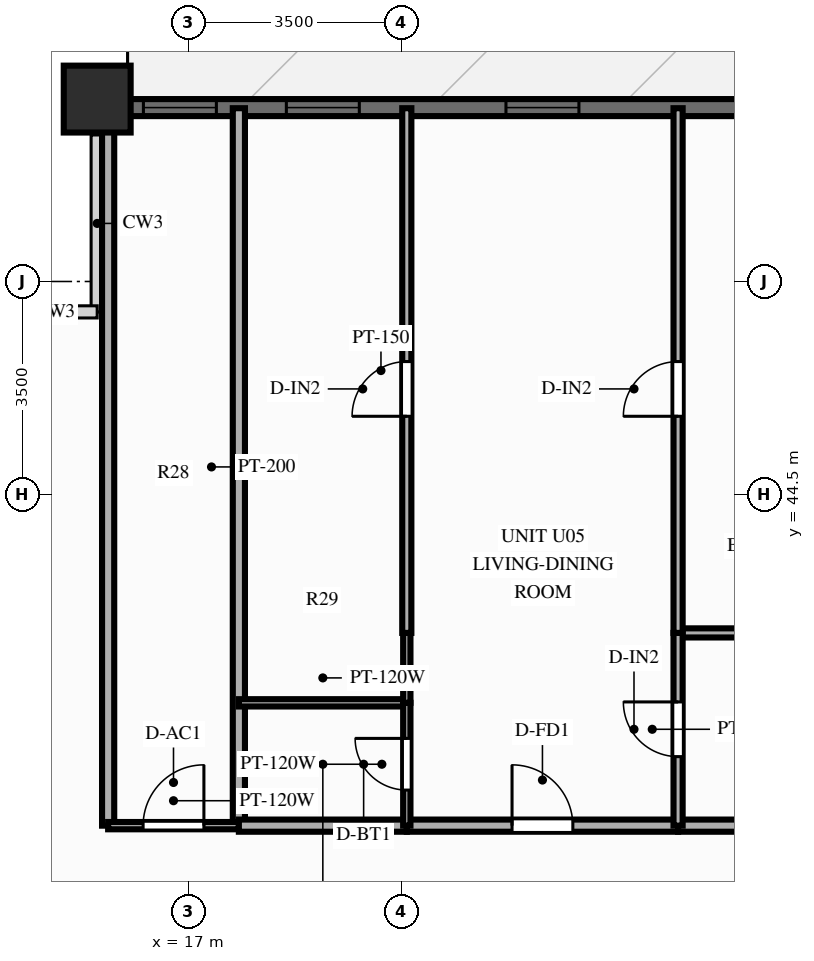
"""IFC4 building model, lengths in metres.
Left out: names, types, materials, properties, quantities, classifications, styles, units other than length and angle.
Written with IfcOpenShell. Run it as: python <this file> out.ifc"""

import sys

from ifc_helpers import new_model, si_unit, direction, frame, frame_2d, origin, origin_2d, place, context, subcontext, project, spatial, rectangle, extrude, source, transform, mapped, element, fill, save


model = new_model("IFC4")
c1 = context("Model", 3, precision=1e-05, world=origin(), true_north=direction((0.0, 1.0)))
c2 = subcontext(c1, "Body", "Model", "MODEL_VIEW")
j1 = project(units=[si_unit("LENGTHUNIT", "METRE"), si_unit("PLANEANGLEUNIT", "RADIAN")], contexts=[c1])
p1 = place(None, origin())
s1 = spatial("IfcSite", under=j1, at=p1, CompositionType="ELEMENT")
p2 = place(p1, origin())
s2 = spatial("IfcBuilding", under=s1, at=p2, CompositionType="ELEMENT")
p3 = place(p2, frame((0.0, 0.0, 34.4)))
s3 = spatial("IfcBuildingStorey", under=s2, at=p3, CompositionType="ELEMENT", Elevation=34.4)
m1 = source(origin(), c2, "Body", "SweptSolid", [
    extrude(rectangle(XDim=1.1, YDim=1.1, at=origin_2d()), origin(), (0.0, 0.0, 1.0), 3.0),
])
p4 = place(p3, frame((15.5, 51.0, 0.0), z_axis=(0.0, 0.0, 1.0), x_axis=(1.0, 0.0, 0.0)))
e1 = element("IfcColumn", 1, at=p4, inside=s3, PredefinedType="COLUMN", context=c2, shape_type="MappedRepresentation", body=[
    mapped(m1, transform((0.0, 0.0, 0.0), scale=1.0)),
])
p5 = place(p3, frame((15.5, 50.86, 0.0), z_axis=(0.0, 0.0, 1.0), x_axis=(1.0, 0.0, 0.0)))
e2 = element("IfcWall", 2, at=p5, inside=s3, PredefinedType="SOLIDWALL", context=c2, shape_type="SweptSolid", body=[
    extrude(rectangle(XDim=45.0, YDim=0.28, at=frame_2d((22.5, 0.0))), origin(), (0.0, 0.0, 1.0), 2.28),
])
p6 = place(p5, frame((0.76, 0.0, 0.25)))
e3 = element("IfcOpeningElement", 3, at=p6, cuts=e2, PredefinedType="OPENING", context=c2, shape_type="SweptSolid", body=[
    extrude(rectangle(XDim=1.2, YDim=1.5, at=frame_2d((0.6, 0.75))), frame((0.0, 0.152, 0.0), z_axis=(0.0, -1.0, 0.0), x_axis=(1.0, 0.0, 0.0)), (0.0, 0.0, 1.0), 0.304),
])
p7 = place(p5, frame((3.111, 0.0, 0.25)))
e4 = element("IfcOpeningElement", 4, at=p7, cuts=e2, PredefinedType="OPENING", context=c2, shape_type="SweptSolid", body=[
    extrude(rectangle(XDim=1.2, YDim=1.5, at=frame_2d((0.6, 0.75))), frame((0.0, 0.152, 0.0), z_axis=(0.0, -1.0, 0.0), x_axis=(1.0, 0.0, 0.0)), (0.0, 0.0, 1.0), 0.304),
])
p8 = place(p5, frame((6.723, 0.0, 0.25)))
e5 = element("IfcOpeningElement", 5, at=p8, cuts=e2, PredefinedType="OPENING", context=c2, shape_type="SweptSolid", body=[
    extrude(rectangle(XDim=1.2, YDim=1.5, at=frame_2d((0.6, 0.75))), frame((0.0, 0.152, 0.0), z_axis=(0.0, -1.0, 0.0), x_axis=(1.0, 0.0, 0.0)), (0.0, 0.0, 1.0), 0.304),
])
p9 = place(p5, frame((10.653, 0.0, 0.25)))
e6 = element("IfcOpeningElement", 6, at=p9, cuts=e2, PredefinedType="OPENING", context=c2, shape_type="SweptSolid", body=[
    extrude(rectangle(XDim=1.2, YDim=1.5, at=frame_2d((0.6, 0.75))), frame((0.0, 0.152, 0.0), z_axis=(0.0, -1.0, 0.0), x_axis=(1.0, 0.0, 0.0)), (0.0, 0.0, 1.0), 0.304),
])
p10 = place(p5, frame((13.681, 0.0, 0.25)))
e7 = element("IfcOpeningElement", 7, at=p10, cuts=e2, PredefinedType="OPENING", context=c2, shape_type="SweptSolid", body=[
    extrude(rectangle(XDim=1.2, YDim=1.5, at=frame_2d((0.6, 0.75))), frame((0.0, 0.152, 0.0), z_axis=(0.0, -1.0, 0.0), x_axis=(1.0, 0.0, 0.0)), (0.0, 0.0, 1.0), 0.304),
])
p11 = place(p5, frame((17.683, 0.0, 0.25)))
e8 = element("IfcOpeningElement", 8, at=p11, cuts=e2, PredefinedType="OPENING", context=c2, shape_type="SweptSolid", body=[
    extrude(rectangle(XDim=1.2, YDim=1.5, at=frame_2d((0.6, 0.75))), frame((0.0, 0.152, 0.0), z_axis=(0.0, -1.0, 0.0), x_axis=(1.0, 0.0, 0.0)), (0.0, 0.0, 1.0), 0.304),
])
p12 = place(p5, frame((21.325, 0.0, 0.0)))
e9 = element("IfcOpeningElement", 9, at=p12, cuts=e2, PredefinedType="OPENING", context=c2, shape_type="SweptSolid", body=[
    extrude(rectangle(XDim=1.1, YDim=2.15, at=frame_2d((0.55, 1.075))), frame((0.0, 0.152, 0.0), z_axis=(0.0, -1.0, 0.0), x_axis=(1.0, 0.0, 0.0)), (0.0, 0.0, 1.0), 0.304),
])
p13 = place(p5, frame((24.356, 0.0, 0.25)))
e10 = element("IfcOpeningElement", 10, at=p13, cuts=e2, PredefinedType="OPENING", context=c2, shape_type="SweptSolid", body=[
    extrude(rectangle(XDim=1.2, YDim=1.5, at=frame_2d((0.6, 0.75))), frame((0.0, 0.152, 0.0), z_axis=(0.0, -1.0, 0.0), x_axis=(1.0, 0.0, 0.0)), (0.0, 0.0, 1.0), 0.304),
])
p14 = place(p5, frame((26.873, 0.0, 0.25)))
e11 = element("IfcOpeningElement", 11, at=p14, cuts=e2, PredefinedType="OPENING", context=c2, shape_type="SweptSolid", body=[
    extrude(rectangle(XDim=1.2, YDim=1.5, at=frame_2d((0.6, 0.75))), frame((0.0, 0.152, 0.0), z_axis=(0.0, -1.0, 0.0), x_axis=(1.0, 0.0, 0.0)), (0.0, 0.0, 1.0), 0.304),
])
p15 = place(p5, frame((29.744, 0.0, 0.25)))
e12 = element("IfcOpeningElement", 12, at=p15, cuts=e2, PredefinedType="OPENING", context=c2, shape_type="SweptSolid", body=[
    extrude(rectangle(XDim=0.7, YDim=1.5, at=frame_2d((0.35, 0.75))), frame((0.0, 0.152, 0.0), z_axis=(0.0, -1.0, 0.0), x_axis=(1.0, 0.0, 0.0)), (0.0, 0.0, 1.0), 0.304),
])
p16 = place(p5, frame((31.898, 0.0, 0.25)))
e13 = element("IfcOpeningElement", 13, at=p16, cuts=e2, PredefinedType="OPENING", context=c2, shape_type="SweptSolid", body=[
    extrude(rectangle(XDim=1.2, YDim=1.5, at=frame_2d((0.6, 0.75))), frame((0.0, 0.152, 0.0), z_axis=(0.0, -1.0, 0.0), x_axis=(1.0, 0.0, 0.0)), (0.0, 0.0, 1.0), 0.304),
])
p17 = place(p5, frame((34.979, 0.0, 0.25)))
e14 = element("IfcOpeningElement", 14, at=p17, cuts=e2, PredefinedType="OPENING", context=c2, shape_type="SweptSolid", body=[
    extrude(rectangle(XDim=1.2, YDim=1.5, at=frame_2d((0.6, 0.75))), frame((0.0, 0.152, 0.0), z_axis=(0.0, -1.0, 0.0), x_axis=(1.0, 0.0, 0.0)), (0.0, 0.0, 1.0), 0.304),
])
p18 = place(p5, frame((38.59, 0.0, 0.25)))
e15 = element("IfcOpeningElement", 15, at=p18, cuts=e2, PredefinedType="OPENING", context=c2, shape_type="SweptSolid", body=[
    extrude(rectangle(XDim=1.2, YDim=1.5, at=frame_2d((0.6, 0.75))), frame((0.0, 0.152, 0.0), z_axis=(0.0, -1.0, 0.0), x_axis=(1.0, 0.0, 0.0)), (0.0, 0.0, 1.0), 0.304),
])
p19 = place(p5, frame((42.415, 0.0, 0.25)))
e16 = element("IfcOpeningElement", 16, at=p19, cuts=e2, PredefinedType="OPENING", context=c2, shape_type="SweptSolid", body=[
    extrude(rectangle(XDim=1.2, YDim=1.5, at=frame_2d((0.6, 0.75))), frame((0.0, 0.152, 0.0), z_axis=(0.0, -1.0, 0.0), x_axis=(1.0, 0.0, 0.0)), (0.0, 0.0, 1.0), 0.304),
])
for number, where, z_axis, x_axis in (
    (17, (15.68, 39.05, 0.0), (0.0, 0.0, 1.0), (0.0, 1.0, 0.0)),
    (18, (17.83, 39.05, 0.0), (0.0, 0.0, 1.0), (0.0, 1.0, 0.0)),
):
    element("IfcWall", number, at=place(p3, frame(where, z_axis=z_axis, x_axis=x_axis)), inside=s3, PredefinedType="PARTITIONING", context=c2, shape_type="SweptSolid", body=[
        extrude(rectangle(XDim=11.8, YDim=0.2, at=frame_2d((5.9, 0.0))), origin(), (0.0, 0.0, 1.0), 2.79),
    ])
p20 = place(p3, frame((15.68, 39.05, 0.0), z_axis=(0.0, 0.0, 1.0), x_axis=(1.0, 0.0, 0.0)))
e19 = element("IfcWall", 19, at=p20, inside=s3, PredefinedType="PARTITIONING", context=c2, shape_type="SweptSolid", body=[
    extrude(rectangle(XDim=2.15, YDim=0.12, at=frame_2d((1.075, 0.0))), origin(), (0.0, 0.0, 1.0), 2.79),
])
p21 = place(p20, frame((0.575, 0.0, 0.0)))
e20 = element("IfcOpeningElement", 20, at=p21, cuts=e19, PredefinedType="OPENING", context=c2, shape_type="SweptSolid", body=[
    extrude(rectangle(XDim=1.0, YDim=2.1, at=frame_2d((0.5, 1.05))), frame((0.0, 0.072, 0.0), z_axis=(0.0, -1.0, 0.0), x_axis=(1.0, 0.0, 0.0)), (0.0, 0.0, 1.0), 0.144),
])
p22 = place(p3, frame((17.83, 39.05, 0.0), z_axis=(0.0, 0.0, 1.0), x_axis=(1.0, 0.0, 0.0)))
e21 = element("IfcWall", 21, at=p22, inside=s3, PredefinedType="PARTITIONING", context=c2, shape_type="SweptSolid", body=[
    extrude(rectangle(XDim=2.762, YDim=0.2, at=frame_2d((1.381, 0.0))), origin(), (0.0, 0.0, 1.0), 2.79),
])
p23 = place(p3, frame((20.592, 39.05, 0.0), z_axis=(0.0, 0.0, 1.0), x_axis=(1.0, 0.0, 0.0)))
e22 = element("IfcWall", 22, at=p23, inside=s3, PredefinedType="PARTITIONING", context=c2, shape_type="SweptSolid", body=[
    extrude(rectangle(XDim=4.461, YDim=0.2, at=frame_2d((2.231, 0.0))), origin(), (0.0, 0.0, 1.0), 2.79),
])
p24 = place(p23, frame((1.731, 0.0, 0.0)))
e23 = element("IfcOpeningElement", 23, at=p24, cuts=e22, PredefinedType="OPENING", context=c2, shape_type="SweptSolid", body=[
    extrude(rectangle(XDim=1.0, YDim=2.15, at=frame_2d((0.5, 1.075))), frame((0.0, 0.112, 0.0), z_axis=(0.0, -1.0, 0.0), x_axis=(1.0, 0.0, 0.0)), (0.0, 0.0, 1.0), 0.224),
])
p25 = place(p3, frame((25.053, 39.05, 0.0), z_axis=(0.0, 0.0, 1.0), x_axis=(1.0, 0.0, 0.0)))
e24 = element("IfcWall", 24, at=p25, inside=s3, PredefinedType="PARTITIONING", context=c2, shape_type="SweptSolid", body=[
    extrude(rectangle(XDim=3.399, YDim=0.2, at=frame_2d((1.7, 0.0))), origin(), (0.0, 0.0, 1.0), 2.79),
])
p26 = place(p3, frame((17.83, 41.07, 0.0), z_axis=(0.0, 0.0, 1.0), x_axis=(1.0, 0.0, 0.0)))
e25 = element("IfcWall", 25, at=p26, inside=s3, PredefinedType="PARTITIONING", context=c2, shape_type="SweptSolid", body=[
    extrude(rectangle(XDim=2.762, YDim=0.12, at=frame_2d((1.381, 0.0))), origin(), (0.0, 0.0, 1.0), 2.79),
])
p27 = place(p3, frame((25.053, 42.22, 0.0), z_axis=(0.0, 0.0, 1.0), x_axis=(1.0, 0.0, 0.0)))
e26 = element("IfcWall", 26, at=p27, inside=s3, PredefinedType="PARTITIONING", context=c2, shape_type="SweptSolid", body=[
    extrude(rectangle(XDim=3.399, YDim=0.15, at=frame_2d((1.7, 0.0))), origin(), (0.0, 0.0, 1.0), 2.79),
])
p28 = place(p3, frame((20.592, 39.05, 0.0), z_axis=(0.0, 0.0, 1.0), x_axis=(0.0, 1.0, 0.0)))
e27 = element("IfcWall", 27, at=p28, inside=s3, PredefinedType="PARTITIONING", context=c2, shape_type="SweptSolid", body=[
    extrude(rectangle(XDim=2.02, YDim=0.12, at=frame_2d((1.01, 0.0))), origin(), (0.0, 0.0, 1.0), 2.79),
])
p29 = place(p28, frame((0.585, 0.0, 0.0)))
e28 = element("IfcOpeningElement", 28, at=p29, cuts=e27, PredefinedType="OPENING", context=c2, shape_type="SweptSolid", body=[
    extrude(rectangle(XDim=0.85, YDim=2.05, at=frame_2d((0.425, 1.025))), frame((0.0, 0.072, 0.0), z_axis=(0.0, -1.0, 0.0), x_axis=(1.0, 0.0, 0.0)), (0.0, 0.0, 1.0), 0.144),
])
p30 = place(p3, frame((20.592, 41.07, 0.0), z_axis=(0.0, 0.0, 1.0), x_axis=(0.0, 1.0, 0.0)))
e29 = element("IfcWall", 29, at=p30, inside=s3, PredefinedType="PARTITIONING", context=c2, shape_type="SweptSolid", body=[
    extrude(rectangle(XDim=1.15, YDim=0.12, at=frame_2d((0.575, 0.0))), origin(), (0.0, 0.0, 1.0), 2.79),
])
p31 = place(p3, frame((20.592, 42.22, 0.0), z_axis=(0.0, 0.0, 1.0), x_axis=(0.0, 1.0, 0.0)))
e30 = element("IfcWall", 30, at=p31, inside=s3, PredefinedType="PARTITIONING", context=c2, shape_type="SweptSolid", body=[
    extrude(rectangle(XDim=8.63, YDim=0.15, at=frame_2d((4.315, 0.0))), origin(), (0.0, 0.0, 1.0), 2.79),
])
p32 = place(p31, frame((3.563, 0.0, 0.0)))
e31 = element("IfcOpeningElement", 31, at=p32, cuts=e30, PredefinedType="OPENING", context=c2, shape_type="SweptSolid", body=[
    extrude(rectangle(XDim=0.9, YDim=2.1, at=frame_2d((0.45, 1.05))), frame((0.0, 0.087, 0.0), z_axis=(0.0, -1.0, 0.0), x_axis=(1.0, 0.0, 0.0)), (0.0, 0.0, 1.0), 0.174),
])
p33 = place(p3, frame((25.053, 39.05, 0.0), z_axis=(0.0, 0.0, 1.0), x_axis=(0.0, 1.0, 0.0)))
e32 = element("IfcWall", 32, at=p33, inside=s3, PredefinedType="PARTITIONING", context=c2, shape_type="SweptSolid", body=[
    extrude(rectangle(XDim=3.17, YDim=0.15, at=frame_2d((1.585, 0.0))), origin(), (0.0, 0.0, 1.0), 2.79),
])
p34 = place(p33, frame((1.135, 0.0, 0.0)))
e33 = element("IfcOpeningElement", 33, at=p34, cuts=e32, PredefinedType="OPENING", context=c2, shape_type="SweptSolid", body=[
    extrude(rectangle(XDim=0.9, YDim=2.1, at=frame_2d((0.45, 1.05))), frame((0.0, 0.087, 0.0), z_axis=(0.0, -1.0, 0.0), x_axis=(1.0, 0.0, 0.0)), (0.0, 0.0, 1.0), 0.174),
])
p35 = place(p3, frame((25.053, 42.22, 0.0), z_axis=(0.0, 0.0, 1.0), x_axis=(0.0, 1.0, 0.0)))
e34 = element("IfcWall", 34, at=p35, inside=s3, PredefinedType="PARTITIONING", context=c2, shape_type="SweptSolid", body=[
    extrude(rectangle(XDim=8.63, YDim=0.15, at=frame_2d((4.315, 0.0))), origin(), (0.0, 0.0, 1.0), 2.79),
])
p36 = place(p35, frame((3.563, 0.0, 0.0)))
e35 = element("IfcOpeningElement", 35, at=p36, cuts=e34, PredefinedType="OPENING", context=c2, shape_type="SweptSolid", body=[
    extrude(rectangle(XDim=0.9, YDim=2.1, at=frame_2d((0.45, 1.05))), frame((0.0, 0.087, 0.0), z_axis=(0.0, -1.0, 0.0), x_axis=(1.0, 0.0, 0.0)), (0.0, 0.0, 1.0), 0.174),
])
m2 = source(origin(), c2, "Body", "SweptSolid", [
    extrude(rectangle(XDim=1.2, YDim=1.5, at=frame_2d((0.6, 0.75))), frame((0.0, 0.03, 0.0), z_axis=(0.0, -1.0, 0.0), x_axis=(1.0, 0.0, 0.0)), (0.0, 0.0, 1.0), 0.06),
])
p37 = place(p6, origin())
e36 = element("IfcWindow", 36, at=p37, inside=s3, PartitioningType="SINGLE_PANEL", PredefinedType="WINDOW", context=c2, shape_type="MappedRepresentation", body=[
    mapped(m2, transform((0.0, 0.0, 0.0), scale=1.0)),
])
fill(e3, e36)
p38 = place(p7, origin())
e37 = element("IfcWindow", 37, at=p38, inside=s3, PartitioningType="SINGLE_PANEL", PredefinedType="WINDOW", context=c2, shape_type="MappedRepresentation", body=[
    mapped(m2, transform((0.0, 0.0, 0.0), scale=1.0)),
])
fill(e4, e37)
p39 = place(p8, origin())
e38 = element("IfcWindow", 38, at=p39, inside=s3, PartitioningType="SINGLE_PANEL", PredefinedType="WINDOW", context=c2, shape_type="MappedRepresentation", body=[
    mapped(m2, transform((0.0, 0.0, 0.0), scale=1.0)),
])
fill(e5, e38)
m3 = source(origin(), c2, "Body", "SweptSolid", [
    extrude(rectangle(XDim=1.0, YDim=2.1, at=frame_2d((0.5, 1.05))), frame((0.0, 0.025, 0.0), z_axis=(0.0, -1.0, 0.0), x_axis=(1.0, 0.0, 0.0)), (0.0, 0.0, 1.0), 0.05),
])
p40 = place(p21, origin())
e39 = element("IfcDoor", 39, at=p40, inside=s3, OperationType="SINGLE_SWING_RIGHT", PredefinedType="DOOR", context=c2, shape_type="MappedRepresentation", body=[
    mapped(m3, transform((0.0, 0.0, 0.0), scale=1.0)),
])
fill(e20, e39)
m4 = source(origin(), c2, "Body", "SweptSolid", [
    extrude(rectangle(XDim=1.0, YDim=2.15, at=frame_2d((0.5, 1.075))), frame((0.0, 0.025, 0.0), z_axis=(0.0, -1.0, 0.0), x_axis=(1.0, 0.0, 0.0)), (0.0, 0.0, 1.0), 0.05),
])
p41 = place(p24, origin())
e40 = element("IfcDoor", 40, at=p41, inside=s3, OperationType="SINGLE_SWING_LEFT", PredefinedType="DOOR", context=c2, shape_type="MappedRepresentation", body=[
    mapped(m4, transform((0.0, 0.0, 0.0), scale=1.0)),
])
fill(e23, e40)
m5 = source(origin(), c2, "Body", "SweptSolid", [
    extrude(rectangle(XDim=0.85, YDim=2.05, at=frame_2d((0.425, 1.025))), frame((0.0, 0.025, 0.0), z_axis=(0.0, -1.0, 0.0), x_axis=(1.0, 0.0, 0.0)), (0.0, 0.0, 1.0), 0.05),
])
p42 = place(p29, origin())
e41 = element("IfcDoor", 41, at=p42, inside=s3, OperationType="SINGLE_SWING_RIGHT", PredefinedType="DOOR", context=c2, shape_type="MappedRepresentation", body=[
    mapped(m5, transform((0.0, 0.0, 0.0), scale=1.0)),
])
fill(e28, e41)
m6 = source(origin(), c2, "Body", "SweptSolid", [
    extrude(rectangle(XDim=0.9, YDim=2.1, at=frame_2d((0.45, 1.05))), frame((0.0, 0.025, 0.0), z_axis=(0.0, -1.0, 0.0), x_axis=(1.0, 0.0, 0.0)), (0.0, 0.0, 1.0), 0.05),
])
p43 = place(p32, origin())
e42 = element("IfcDoor", 42, at=p43, inside=s3, OperationType="SINGLE_SWING_LEFT", PredefinedType="DOOR", context=c2, shape_type="MappedRepresentation", body=[
    mapped(m6, transform((0.0, 0.0, 0.0), scale=1.0)),
])
fill(e31, e42)
p44 = place(p34, origin())
e43 = element("IfcDoor", 43, at=p44, inside=s3, OperationType="SINGLE_SWING_RIGHT", PredefinedType="DOOR", context=c2, shape_type="MappedRepresentation", body=[
    mapped(m6, transform((0.0, 0.0, 0.0), scale=1.0)),
])
fill(e33, e43)
p45 = place(p36, origin())
e44 = element("IfcDoor", 44, at=p45, inside=s3, OperationType="SINGLE_SWING_LEFT", PredefinedType="DOOR", context=c2, shape_type="MappedRepresentation", body=[
    mapped(m6, transform((0.0, 0.0, 0.0), scale=1.0)),
])
fill(e35, e44)
save(model, sys.argv[1])
